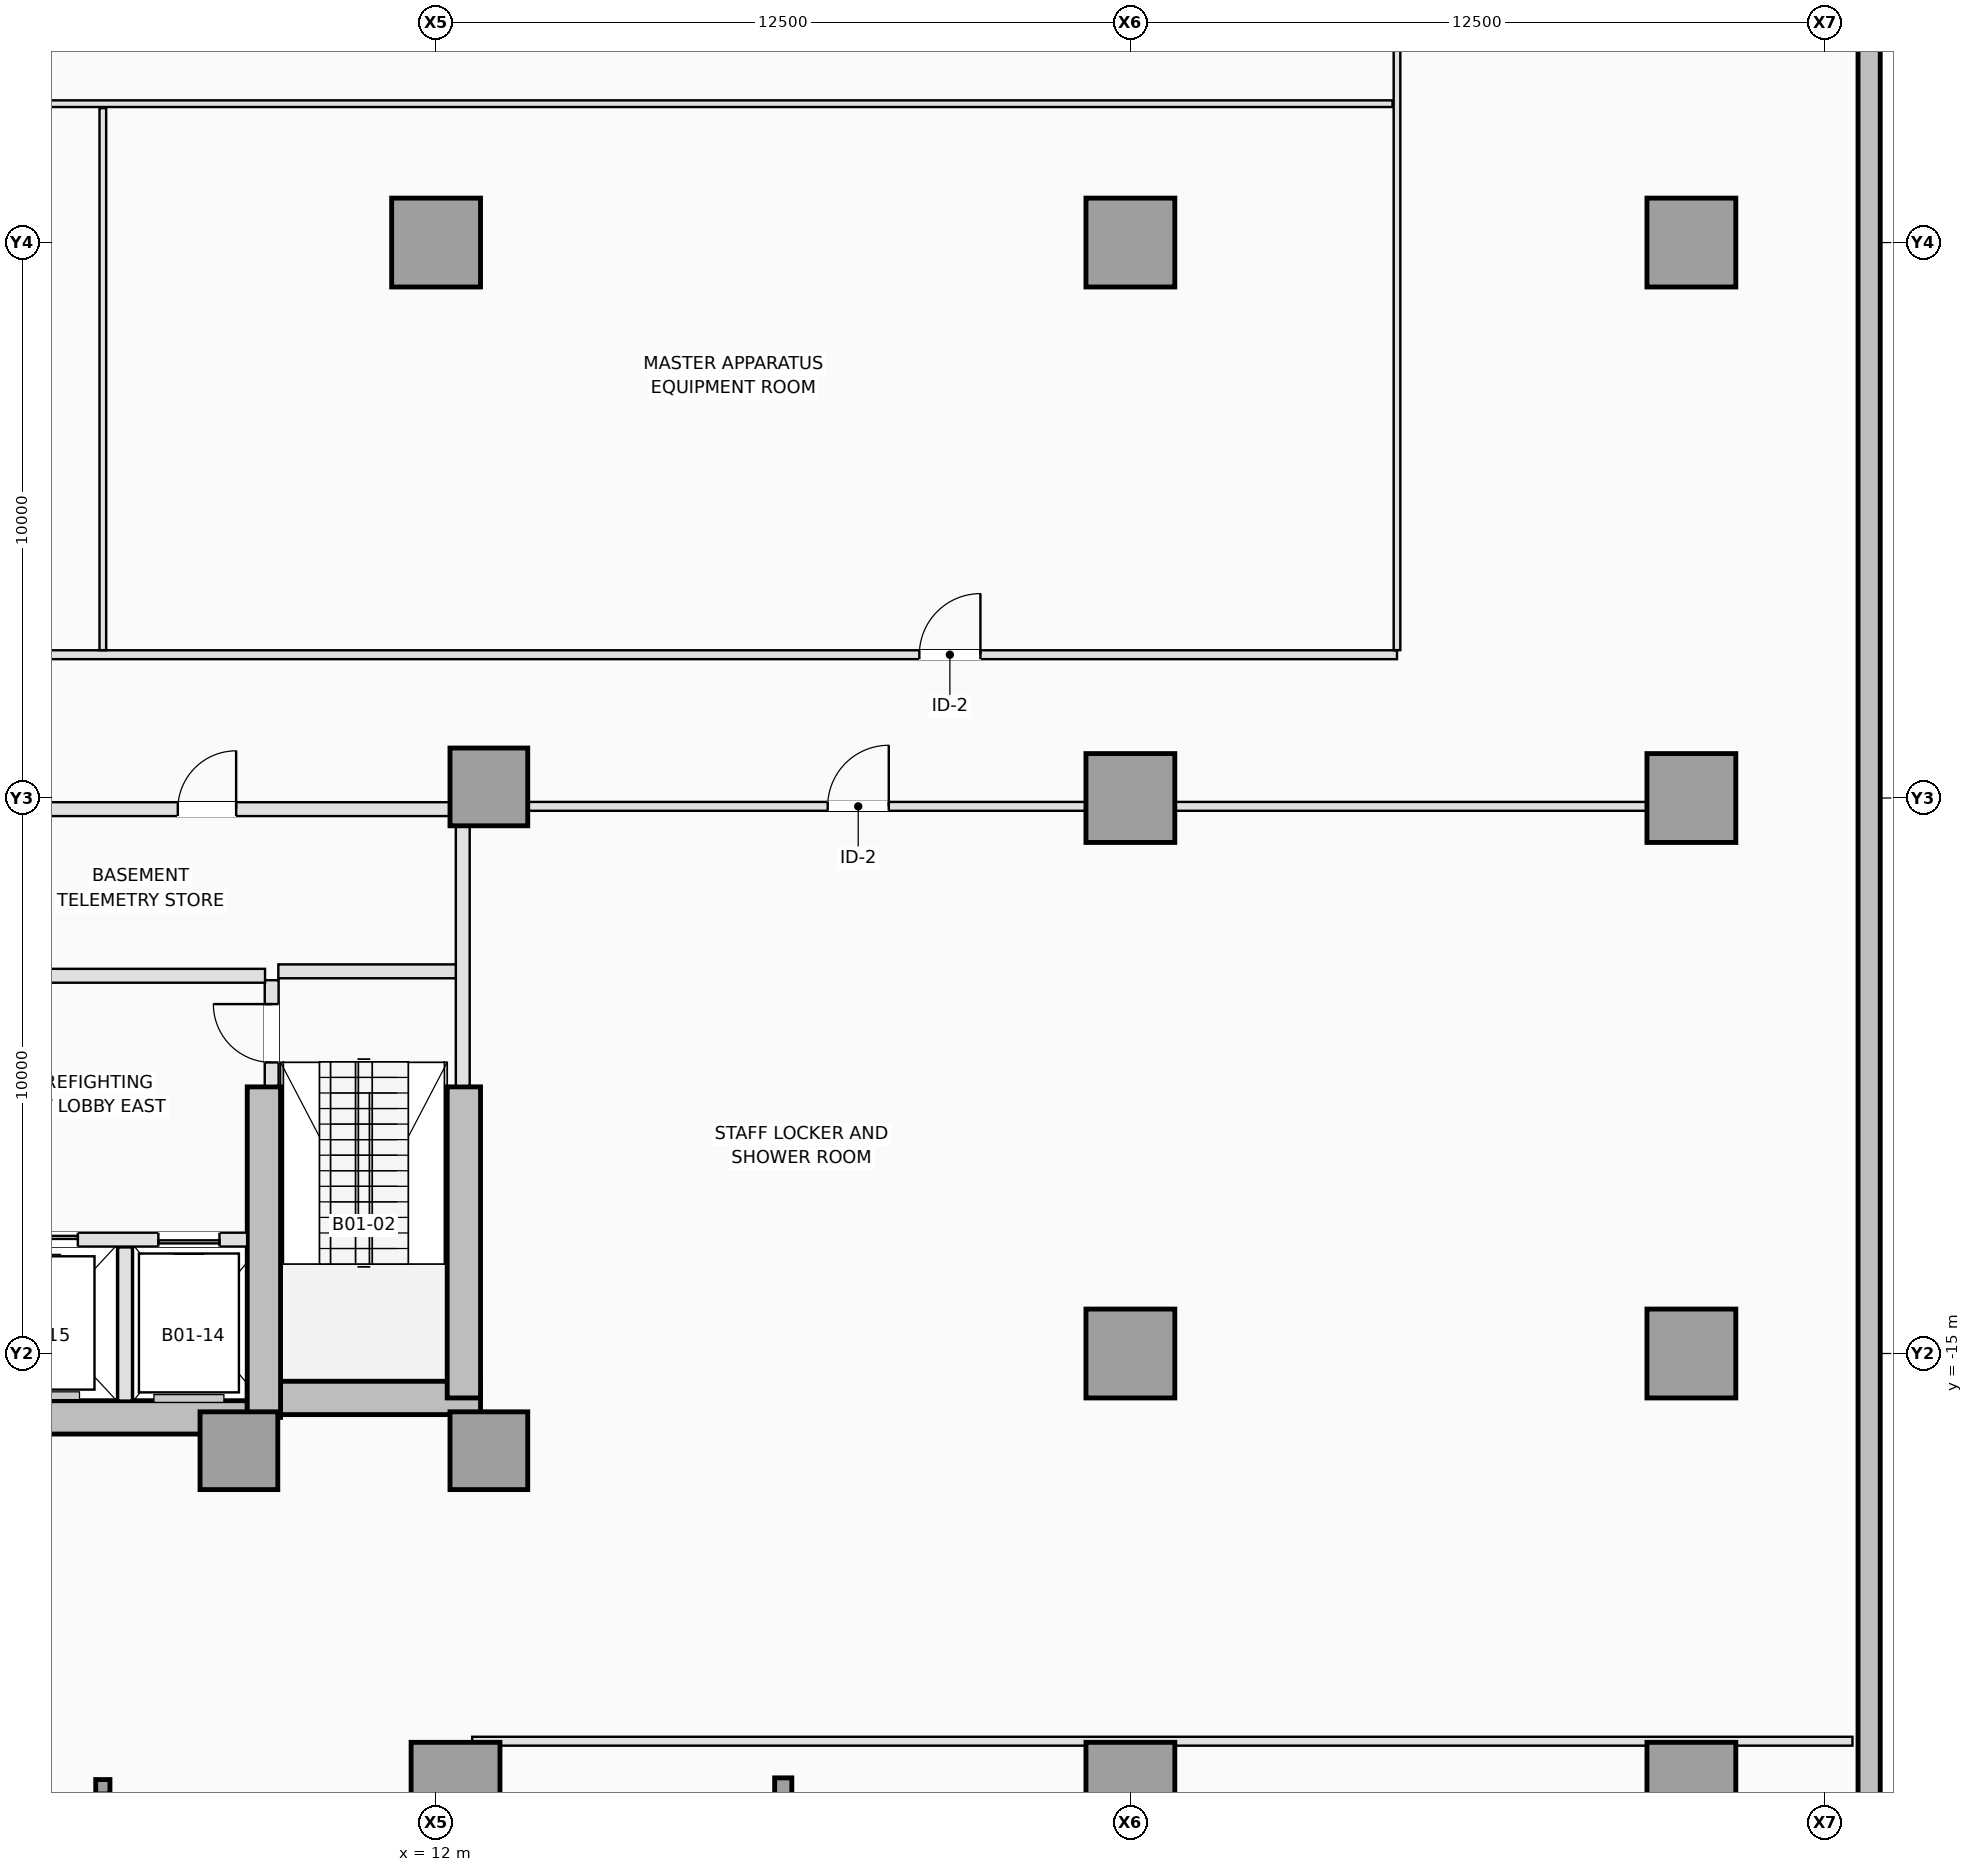
"""IFC4 building model, lengths in metres.
Left out: names, types, materials, properties, quantities, classifications, styles, units other than length and angle.
Written with IfcOpenShell. Run it as: python <this file> out.ifc"""

import sys

from ifc_helpers import new_model, si_unit, direction, frame, frame_2d, origin, origin_2d, place, context, subcontext, project, spatial, rectangle, i_section, extrude, element, fill, save


model = new_model("IFC4")
c1 = context("Model", 3, precision=1e-05, world=origin(), true_north=direction((0.0, 1.0)))
c2 = subcontext(c1, "Body", "Model", "MODEL_VIEW")
j1 = project(units=[si_unit("LENGTHUNIT", "METRE"), si_unit("PLANEANGLEUNIT", "RADIAN")], contexts=[c1])
p1 = place(None, origin())
s1 = spatial("IfcSite", under=j1, at=p1, CompositionType="ELEMENT")
p2 = place(p1, origin())
s2 = spatial("IfcBuilding", under=s1, at=p2, CompositionType="ELEMENT")
p3 = place(p2, frame((0.0, 0.0, -5.0)))
s3 = spatial("IfcBuildingStorey", under=s2, at=p3, CompositionType="ELEMENT", Elevation=-5.0)
p4 = place(p3, frame((37.8, 25.817, 0.0), z_axis=(0.0, 0.0, 1.0), x_axis=(0.0, -1.0, 0.0)))
e1 = element("IfcWall", 1, at=p4, inside=s3, PredefinedType="USERDEFINED", context=c2, shape_type="SweptSolid", body=[
    extrude(rectangle(XDim=51.434, YDim=0.4, at=frame_2d((25.717, 0.0))), origin(), (0.0, 0.0, 1.0), 5.0),
])
p5 = place(p3, frame((3.75, -16.15, 0.0), z_axis=(0.0, 0.0, 1.0), x_axis=(1.0, 0.0, 0.0)))
e2 = element("IfcWall", 2, at=p5, inside=s3, PredefinedType="SHEAR", context=c2, shape_type="SweptSolid", body=[
    extrude(rectangle(XDim=5.15, YDim=0.6, at=frame_2d((2.575, 0.0))), origin(), (0.0, 0.0, 1.0), 5.0),
])
p6 = place(p3, frame((8.6, -15.8, 0.0), z_axis=(0.0, 0.0, 1.0), x_axis=(1.0, 0.0, 0.0)))
e3 = element("IfcWall", 3, at=p6, inside=s3, PredefinedType="SHEAR", context=c2, shape_type="SweptSolid", body=[
    extrude(rectangle(XDim=4.2, YDim=0.6, at=frame_2d((2.1, 0.0))), origin(), (0.0, 0.0, 1.0), 5.0),
])
p7 = place(p3, frame((12.5, -15.8, 0.0), z_axis=(0.0, 0.0, 1.0), x_axis=(0.0, 1.0, 0.0)))
e4 = element("IfcWall", 4, at=p7, inside=s3, PredefinedType="SHEAR", context=c2, shape_type="SweptSolid", body=[
    extrude(rectangle(XDim=5.6, YDim=0.6, at=frame_2d((2.8, 0.0))), origin(), (0.0, 0.0, 1.0), 5.0),
])
p8 = place(p3, frame((8.9, -16.15, 0.0), z_axis=(0.0, 0.0, 1.0), x_axis=(0.0, 1.0, 0.0)))
e5 = element("IfcWall", 5, at=p8, inside=s3, PredefinedType="SHEAR", context=c2, shape_type="SweptSolid", body=[
    extrude(rectangle(XDim=5.95, YDim=0.6, at=frame_2d((2.975, 0.0))), origin(), (0.0, 0.0, 1.0), 5.0),
])
for number, where, z_axis, x_axis in (
    (6, (8.45, -16.75, 0.0), (0.0, 0.0, 1.0), (1.0, 0.0, 0.0)),
    (7, (12.95, -16.75, 0.0), (0.0, 0.0, 1.0), (1.0, 0.0, 0.0)),
    (8, (12.95, -4.8, 0.0), (0.0, 0.0, 1.0), (1.0, 0.0, 0.0)),
):
    element("IfcColumn", number, at=place(p3, frame(where, z_axis=z_axis, x_axis=x_axis)), inside=s3, PredefinedType="COLUMN", context=c2, shape_type="SweptSolid", body=[
        extrude(rectangle(XDim=1.4, YDim=1.4, at=origin_2d()), origin(), (0.0, 0.0, 1.0), 5.0),
    ])
for number, where, z_axis, x_axis in (
    (9, (12.35, -22.8, 0.0), (0.0, 0.0, 1.0), (1.0, 0.0, 0.0)),
    (10, (24.5, -22.8, 0.0), (0.0, 0.0, 1.0), (1.0, 0.0, 0.0)),
    (11, (34.6, -22.8, 0.0), (0.0, 0.0, 1.0), (1.0, 0.0, 0.0)),
    (12, (24.5, -15.0, 0.0), (0.0, 0.0, 1.0), (1.0, 0.0, 0.0)),
    (13, (34.6, -15.0, 0.0), (0.0, 0.0, 1.0), (1.0, 0.0, 0.0)),
    (14, (24.5, -5.0, 0.0), (0.0, 0.0, 1.0), (1.0, 0.0, 0.0)),
    (15, (34.6, -5.0, 0.0), (0.0, 0.0, 1.0), (1.0, 0.0, 0.0)),
    (16, (12.0, 5.0, 0.0), (0.0, 0.0, 1.0), (1.0, 0.0, 0.0)),
    (17, (24.5, 5.0, 0.0), (0.0, 0.0, 1.0), (1.0, 0.0, 0.0)),
    (18, (34.6, 5.0, 0.0), (0.0, 0.0, 1.0), (1.0, 0.0, 0.0)),
):
    element("IfcColumn", number, at=place(p3, frame(where, z_axis=z_axis, x_axis=x_axis)), inside=s3, PredefinedType="COLUMN", context=c2, shape_type="SweptSolid", body=[
        extrude(rectangle(XDim=1.6, YDim=1.6, at=origin_2d()), origin(), (0.0, 0.0, 1.0), 5.0),
    ])
p9 = place(p3, frame((18.25, -22.8, 0.0), z_axis=(0.0, 0.0, 1.0), x_axis=(1.0, 0.0, 0.0)))
e19 = element("IfcColumn", 19, at=p9, inside=s3, PredefinedType="COLUMN", context=c2, shape_type="SweptSolid", body=[
    extrude(i_section(OverallWidth=0.309, OverallDepth=0.321, WebThickness=0.014, FlangeThickness=0.022, FilletRadius=0.017, at=origin_2d()), origin(), (0.0, 0.0, 1.0), 5.0),
])
p10 = place(p3, frame((6.0, -22.8, 0.0), z_axis=(0.0, 0.0, 1.0), x_axis=(1.0, 0.0, 0.0)))
e20 = element("IfcColumn", 20, at=p10, inside=s3, PredefinedType="COLUMN", context=c2, shape_type="SweptSolid", body=[
    extrude(i_section(OverallWidth=0.256, OverallDepth=0.26, WebThickness=0.01, FlangeThickness=0.017, FilletRadius=0.014, at=origin_2d()), origin(), (0.0, 0.0, 1.0), 5.0),
])
p11 = place(p3, frame((9.04, -10.18, 0.0), z_axis=(0.0, 0.0, 1.0), x_axis=(0.0, 1.0, 0.0)))
e21 = element("IfcWall", 21, at=p11, inside=s3, PredefinedType="PARTITIONING", context=c2, shape_type="SweptSolid", body=[
    extrude(rectangle(XDim=1.9, YDim=0.25, at=frame_2d((0.95, 0.0))), origin(), (0.0, 0.0, 1.0), 4.7),
])
p12 = place(p11, frame((0.42, 0.0, 0.0)))
e22 = element("IfcOpeningElement", 22, at=p12, cuts=e21, PredefinedType="OPENING", context=c2, shape_type="SweptSolid", body=[
    extrude(rectangle(XDim=1.05, YDim=2.15, at=frame_2d((0.525, 1.075))), frame((0.0, 0.135, 0.0), z_axis=(0.0, -1.0, 0.0), x_axis=(1.0, 0.0, 0.0)), (0.0, 0.0, 1.0), 0.27),
])
p13 = place(p3, frame((9.16, -8.12, 0.0), z_axis=(0.0, 0.0, 1.0), x_axis=(1.0, 0.0, 0.0)))
e23 = element("IfcWall", 23, at=p13, inside=s3, PredefinedType="PARTITIONING", context=c2, shape_type="SweptSolid", body=[
    extrude(rectangle(XDim=3.22, YDim=0.25, at=frame_2d((1.61, 0.0))), origin(), (0.0, 0.0, 1.0), 4.7),
])
p14 = place(p3, frame((12.48, -10.18, 0.0), z_axis=(0.0, 0.0, 1.0), x_axis=(0.0, 1.0, 0.0)))
e24 = element("IfcWall", 24, at=p14, inside=s3, PredefinedType="PARTITIONING", context=c2, shape_type="SweptSolid", body=[
    extrude(rectangle(XDim=4.678, YDim=0.25, at=frame_2d((2.339, 0.0))), origin(), (0.0, 0.0, 1.0), 4.7),
])
p15 = place(p3, frame((3.68, -12.95, 0.0), z_axis=(0.0, 0.0, 1.0), x_axis=(1.0, 0.0, 0.0)))
e25 = element("IfcWall", 25, at=p15, inside=s3, PredefinedType="PARTITIONING", context=c2, shape_type="SweptSolid", body=[
    extrude(rectangle(XDim=4.918, YDim=0.25, at=frame_2d((2.459, 0.0))), origin(), (0.0, 0.0, 1.0), 4.7),
])
p16 = place(p15, frame((3.32, 0.0, 0.0)))
e26 = element("IfcOpeningElement", 26, at=p16, cuts=e25, PredefinedType="OPENING", context=c2, shape_type="SweptSolid", body=[
    extrude(rectangle(XDim=1.1, YDim=2.15, at=frame_2d((0.55, 1.075))), frame((0.0, 0.135, 0.0), z_axis=(0.0, -1.0, 0.0), x_axis=(1.0, 0.0, 0.0)), (0.0, 0.0, 1.0), 0.27),
])
p17 = place(p15, frame((0.67, 0.0, 0.0)))
e27 = element("IfcOpeningElement", 27, at=p17, cuts=e25, PredefinedType="OPENING", context=c2, shape_type="SweptSolid", body=[
    extrude(rectangle(XDim=1.2, YDim=2.15, at=frame_2d((0.6, 1.075))), frame((0.0, 0.135, 0.0), z_axis=(0.0, -1.0, 0.0), x_axis=(1.0, 0.0, 0.0)), (0.0, 0.0, 1.0), 0.27),
])
p18 = place(p3, frame((6.4, -15.848, 0.0), z_axis=(0.0, 0.0, 1.0), x_axis=(0.0, 1.0, 0.0)))
e28 = element("IfcWall", 28, at=p18, inside=s3, PredefinedType="PARTITIONING", context=c2, shape_type="SweptSolid", body=[
    extrude(rectangle(XDim=2.758, YDim=0.25, at=frame_2d((1.379, 0.0))), origin(), (0.0, 0.0, 1.0), 4.7),
])
p19 = place(p3, frame((3.68, -8.2, 0.0), z_axis=(0.0, 0.0, 1.0), x_axis=(1.0, 0.0, 0.0)))
e29 = element("IfcWall", 29, at=p19, inside=s3, PredefinedType="PARTITIONING", context=c2, shape_type="SweptSolid", body=[
    extrude(rectangle(XDim=5.24, YDim=0.25, at=frame_2d((2.62, 0.0))), origin(), (0.0, 0.0, 1.0), 4.7),
])
p20 = place(p3, frame((4.452, -5.2, 0.0), z_axis=(0.0, 0.0, 1.0), x_axis=(1.0, 0.0, 0.0)))
e30 = element("IfcWall", 30, at=p20, inside=s3, PredefinedType="PARTITIONING", context=c2, shape_type="SweptSolid", body=[
    extrude(rectangle(XDim=7.796, YDim=0.25, at=frame_2d((3.898, 0.0))), origin(), (0.0, 0.0, 1.0), 4.7),
])
p21 = place(p20, frame((2.898, 0.0, 0.0)))
e31 = element("IfcOpeningElement", 31, at=p21, cuts=e30, PredefinedType="OPENING", context=c2, shape_type="SweptSolid", body=[
    extrude(rectangle(XDim=1.05, YDim=2.12, at=frame_2d((0.525, 1.06))), frame((0.0, 0.135, 0.0), z_axis=(0.0, -1.0, 0.0), x_axis=(1.0, 0.0, 0.0)), (0.0, 0.0, 1.0), 0.27),
])
p22 = place(p3, frame((12.65, -21.98, 0.0), z_axis=(0.0, 0.0, 1.0), x_axis=(1.0, 0.0, 0.0)))
e32 = element("IfcWall", 32, at=p22, inside=s3, PredefinedType="PARTITIONING", context=c2, shape_type="SweptSolid", body=[
    extrude(rectangle(XDim=24.85, YDim=0.16, at=frame_2d((12.425, 0.0))), origin(), (0.0, 0.0, 1.0), 4.7),
])
p23 = place(p3, frame((-29.3, -2.42, 0.0), z_axis=(0.0, 0.0, 1.0), x_axis=(1.0, 0.0, 0.0)))
e33 = element("IfcWall", 33, at=p23, inside=s3, PredefinedType="PARTITIONING", context=c2, shape_type="SweptSolid", body=[
    extrude(rectangle(XDim=58.6, YDim=0.16, at=frame_2d((29.3, 0.0))), origin(), (0.0, 0.0, 1.0), 4.7),
])
p24 = place(p23, frame((5.5, 0.0, 0.0)))
e34 = element("IfcOpeningElement", 34, at=p24, cuts=e33, PredefinedType="OPENING", context=c2, shape_type="SweptSolid", body=[
    extrude(rectangle(XDim=1.1, YDim=2.15, at=frame_2d((0.55, 1.075))), frame((0.0, 0.09, 0.0), z_axis=(0.0, -1.0, 0.0), x_axis=(1.0, 0.0, 0.0)), (0.0, 0.0, 1.0), 0.18),
])
p25 = place(p23, frame((50.0, 0.0, 0.0)))
e35 = element("IfcOpeningElement", 35, at=p25, cuts=e33, PredefinedType="OPENING", context=c2, shape_type="SweptSolid", body=[
    extrude(rectangle(XDim=1.1, YDim=2.15, at=frame_2d((0.55, 1.075))), frame((0.0, 0.09, 0.0), z_axis=(0.0, -1.0, 0.0), x_axis=(1.0, 0.0, 0.0)), (0.0, 0.0, 1.0), 0.18),
])
p26 = place(p3, frame((13.652, -5.15, 0.0), z_axis=(0.0, 0.0, 1.0), x_axis=(1.0, 0.0, 0.0)))
e36 = element("IfcWall", 36, at=p26, inside=s3, PredefinedType="PARTITIONING", context=c2, shape_type="SweptSolid", body=[
    extrude(rectangle(XDim=10.046, YDim=0.16, at=frame_2d((5.023, 0.0))), origin(), (0.0, 0.0, 1.0), 3.676),
])
p27 = place(p26, frame((5.398, 0.0, 0.0)))
e37 = element("IfcOpeningElement", 37, at=p27, cuts=e36, PredefinedType="OPENING", context=c2, shape_type="SweptSolid", body=[
    extrude(rectangle(XDim=1.1, YDim=2.15, at=frame_2d((0.55, 1.075))), frame((0.0, 0.09, 0.0), z_axis=(0.0, -1.0, 0.0), x_axis=(1.0, 0.0, 0.0)), (0.0, 0.0, 1.0), 0.18),
])
p28 = place(p3, frame((25.302, -5.15, 0.0), z_axis=(0.0, 0.0, 1.0), x_axis=(1.0, 0.0, 0.0)))
e38 = element("IfcWall", 38, at=p28, inside=s3, PredefinedType="PARTITIONING", context=c2, shape_type="SweptSolid", body=[
    extrude(rectangle(XDim=8.496, YDim=0.16, at=frame_2d((4.248, 0.0))), origin(), (0.0, 0.0, 1.0), 3.676),
])
p29 = place(p3, frame((29.3, -2.338, 0.0), z_axis=(0.0, 0.0, 1.0), x_axis=(0.0, 1.0, 0.0)))
e39 = element("IfcWall", 39, at=p29, inside=s3, PredefinedType="PARTITIONING", context=c2, shape_type="SweptSolid", body=[
    extrude(rectangle(XDim=15.088, YDim=0.12, at=frame_2d((7.544, 0.0))), origin(), (0.0, 0.0, 1.0), 4.7),
])
p30 = place(p3, frame((6.0, -2.338, 0.0), z_axis=(0.0, 0.0, 1.0), x_axis=(0.0, 1.0, 0.0)))
e40 = element("IfcWall", 40, at=p30, inside=s3, PredefinedType="PARTITIONING", context=c2, shape_type="SweptSolid", body=[
    extrude(rectangle(XDim=9.758, YDim=0.12, at=frame_2d((4.879, 0.0))), origin(), (0.0, 0.0, 1.0), 4.7),
])
p31 = place(p3, frame((-29.22, 7.5, 0.0), z_axis=(0.0, 0.0, 1.0), x_axis=(1.0, 0.0, 0.0)))
e41 = element("IfcWall", 41, at=p31, inside=s3, PredefinedType="PARTITIONING", context=c2, shape_type="SweptSolid", body=[
    extrude(rectangle(XDim=58.44, YDim=0.12, at=frame_2d((29.22, 0.0))), origin(), (0.0, 0.0, 1.0), 4.7),
])
p32 = place(p16, origin())
e42 = element("IfcDoor", 42, at=p32, inside=s3, OperationType="SLIDING_TO_RIGHT", PredefinedType="DOOR", context=c2, shape_type="SweptSolid", body=[
    extrude(rectangle(XDim=1.1, YDim=2.15, at=frame_2d((0.55, 1.075))), frame((0.0, 0.025, 0.0), z_axis=(0.0, -1.0, 0.0), x_axis=(1.0, 0.0, 0.0)), (0.0, 0.0, 1.0), 0.05),
])
fill(e26, e42)
p33 = place(p17, origin())
e43 = element("IfcDoor", 43, at=p33, inside=s3, OperationType="SLIDING_TO_LEFT", PredefinedType="DOOR", context=c2, shape_type="SweptSolid", body=[
    extrude(rectangle(XDim=1.2, YDim=2.15, at=frame_2d((0.6, 1.075))), frame((0.0, 0.025, 0.0), z_axis=(0.0, -1.0, 0.0), x_axis=(1.0, 0.0, 0.0)), (0.0, 0.0, 1.0), 0.05),
])
fill(e27, e43)
p34 = place(p12, origin())
e44 = element("IfcDoor", 44, at=p34, inside=s3, OperationType="SINGLE_SWING_RIGHT", PredefinedType="DOOR", context=c2, shape_type="SweptSolid", body=[
    extrude(rectangle(XDim=1.05, YDim=2.15, at=frame_2d((0.525, 1.075))), frame((0.0, 0.025, 0.0), z_axis=(0.0, -1.0, 0.0), x_axis=(1.0, 0.0, 0.0)), (0.0, 0.0, 1.0), 0.05),
])
fill(e22, e44)
p35 = place(p21, origin())
e45 = element("IfcDoor", 45, at=p35, inside=s3, OperationType="SINGLE_SWING_RIGHT", PredefinedType="DOOR", context=c2, shape_type="SweptSolid", body=[
    extrude(rectangle(XDim=1.05, YDim=2.12, at=frame_2d((0.525, 1.06))), frame((0.0, 0.025, 0.0), z_axis=(0.0, -1.0, 0.0), x_axis=(1.0, 0.0, 0.0)), (0.0, 0.0, 1.0), 0.05),
])
fill(e31, e45)
p36 = place(p27, origin())
e46 = element("IfcDoor", 46, at=p36, inside=s3, OperationType="SINGLE_SWING_RIGHT", PredefinedType="DOOR", context=c2, shape_type="SweptSolid", body=[
    extrude(rectangle(XDim=1.1, YDim=2.15, at=frame_2d((0.55, 1.075))), frame((0.0, 0.025, 0.0), z_axis=(0.0, -1.0, 0.0), x_axis=(1.0, 0.0, 0.0)), (0.0, 0.0, 1.0), 0.05),
])
fill(e37, e46)
p37 = place(p25, origin())
e47 = element("IfcDoor", 47, at=p37, inside=s3, OperationType="SINGLE_SWING_RIGHT", PredefinedType="DOOR", context=c2, shape_type="SweptSolid", body=[
    extrude(rectangle(XDim=1.1, YDim=2.15, at=frame_2d((0.55, 1.075))), frame((0.0, 0.025, 0.0), z_axis=(0.0, -1.0, 0.0), x_axis=(1.0, 0.0, 0.0)), (0.0, 0.0, 1.0), 0.05),
])
fill(e35, e47)
save(model, sys.argv[1])
